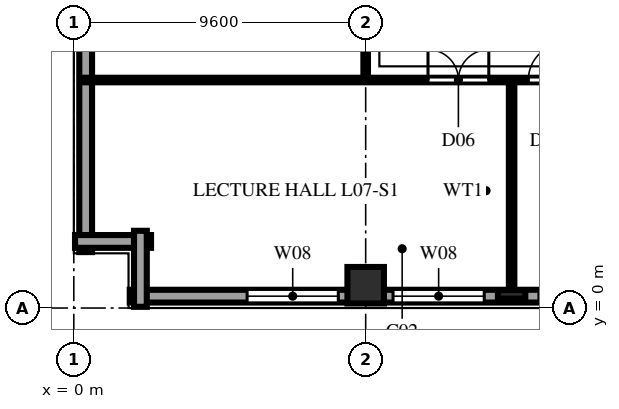
"""IFC4 building model, lengths in metres.
Left out: names, types, materials, properties, quantities, classifications, styles, units other than length and angle.
Written with IfcOpenShell. Run it as: python <this file> out.ifc"""

import sys

from ifc_helpers import new_model, si_unit, direction, frame, frame_2d, origin, origin_2d, place, context, subcontext, project, spatial, rectangle, extrude, element, fill, save


model = new_model("IFC4")
c1 = context("Model", 3, precision=1e-05, world=origin(), true_north=direction((0.0, 1.0)))
c2 = subcontext(c1, "Body", "Model", "MODEL_VIEW")
j1 = project(units=[si_unit("LENGTHUNIT", "METRE"), si_unit("PLANEANGLEUNIT", "RADIAN")], contexts=[c1])
p1 = place(None, origin())
s1 = spatial("IfcSite", under=j1, at=p1, CompositionType="ELEMENT")
p2 = place(p1, origin())
s2 = spatial("IfcBuilding", under=s1, at=p2, CompositionType="ELEMENT")
p3 = place(p2, frame((0.0, 0.0, 31.8)))
s3 = spatial("IfcBuildingStorey", under=s2, at=p3, CompositionType="ELEMENT", Elevation=31.8)
p4 = place(p3, frame((9.6, 0.75, 0.0), z_axis=(0.0, 0.0, 1.0), x_axis=(1.0, 0.0, 0.0)))
e1 = element("IfcColumn", 1, at=p4, inside=s3, PredefinedType="COLUMN", context=c2, shape_type="SweptSolid", body=[
    extrude(rectangle(XDim=1.2, YDim=1.2, at=origin_2d()), origin(), (0.0, 0.0, 1.0), 3.8),
])
p5 = place(p3, frame((14.4, 0.45, 0.0), z_axis=(0.0, 0.0, 1.0), x_axis=(1.0, 0.0, 0.0)))
e2 = element("IfcColumn", 2, at=p5, inside=s3, PredefinedType="PILASTER", context=c2, shape_type="SweptSolid", body=[
    extrude(rectangle(XDim=0.9, YDim=0.28, at=origin_2d()), origin(), (0.0, 0.0, 1.0), 3.8),
])
p6 = place(p3, frame((1.84, 0.39, 0.0), z_axis=(0.0, 0.0, 1.0), x_axis=(1.0, 0.0, 0.0)))
e3 = element("IfcWall", 3, at=p6, inside=s3, PredefinedType="SOLIDWALL", context=c2, shape_type="SweptSolid", body=[
    extrude(rectangle(XDim=63.52, YDim=0.42, at=frame_2d((31.76, 0.0))), origin(), (0.0, 0.0, 1.0), 3.54),
])
p7 = place(p6, frame((3.86, 0.0, 0.75)))
e4 = element("IfcOpeningElement", 4, at=p7, cuts=e3, PredefinedType="OPENING", context=c2, shape_type="SweptSolid", body=[
    extrude(rectangle(XDim=3.0, YDim=1.9, at=frame_2d((1.5, 0.95))), frame((0.0, 0.222, 0.0), z_axis=(0.0, -1.0, 0.0), x_axis=(1.0, 0.0, 0.0)), (0.0, 0.0, 1.0), 0.444),
])
p8 = place(p6, frame((8.66, 0.0, 0.75)))
e5 = element("IfcOpeningElement", 5, at=p8, cuts=e3, PredefinedType="OPENING", context=c2, shape_type="SweptSolid", body=[
    extrude(rectangle(XDim=3.0, YDim=1.9, at=frame_2d((1.5, 0.95))), frame((0.0, 0.222, 0.0), z_axis=(0.0, -1.0, 0.0), x_axis=(1.0, 0.0, 0.0)), (0.0, 0.0, 1.0), 0.444),
])
p9 = place(p6, frame((13.46, 0.0, 0.75)))
e6 = element("IfcOpeningElement", 6, at=p9, cuts=e3, PredefinedType="OPENING", context=c2, shape_type="SweptSolid", body=[
    extrude(rectangle(XDim=3.0, YDim=1.9, at=frame_2d((1.5, 0.95))), frame((0.0, 0.222, 0.0), z_axis=(0.0, -1.0, 0.0), x_axis=(1.0, 0.0, 0.0)), (0.0, 0.0, 1.0), 0.444),
])
p10 = place(p6, frame((18.26, 0.0, 0.75)))
e7 = element("IfcOpeningElement", 7, at=p10, cuts=e3, PredefinedType="OPENING", context=c2, shape_type="SweptSolid", body=[
    extrude(rectangle(XDim=3.0, YDim=1.9, at=frame_2d((1.5, 0.95))), frame((0.0, 0.222, 0.0), z_axis=(0.0, -1.0, 0.0), x_axis=(1.0, 0.0, 0.0)), (0.0, 0.0, 1.0), 0.444),
])
p11 = place(p6, frame((23.06, 0.0, 0.75)))
e8 = element("IfcOpeningElement", 8, at=p11, cuts=e3, PredefinedType="OPENING", context=c2, shape_type="SweptSolid", body=[
    extrude(rectangle(XDim=3.0, YDim=1.9, at=frame_2d((1.5, 0.95))), frame((0.0, 0.222, 0.0), z_axis=(0.0, -1.0, 0.0), x_axis=(1.0, 0.0, 0.0)), (0.0, 0.0, 1.0), 0.444),
])
p12 = place(p3, frame((0.39, 65.36, 0.0), z_axis=(0.0, 0.0, 1.0), x_axis=(0.0, -1.0, 0.0)))
e9 = element("IfcWall", 9, at=p12, inside=s3, PredefinedType="SOLIDWALL", context=c2, shape_type="SweptSolid", body=[
    extrude(rectangle(XDim=63.52, YDim=0.42, at=frame_2d((31.76, 0.0))), origin(), (0.0, 0.0, 1.0), 3.54),
])
p13 = place(p12, frame((4.885, 0.0, 0.9)))
e10 = element("IfcOpeningElement", 10, at=p13, cuts=e9, PredefinedType="OPENING", context=c2, shape_type="SweptSolid", body=[
    extrude(rectangle(XDim=0.95, YDim=1.85, at=frame_2d((0.475, 0.925))), frame((0.0, 0.222, 0.0), z_axis=(0.0, -1.0, 0.0), x_axis=(1.0, 0.0, 0.0)), (0.0, 0.0, 1.0), 0.444),
])
p14 = place(p12, frame((9.41, 0.0, 0.9)))
e11 = element("IfcOpeningElement", 11, at=p14, cuts=e9, PredefinedType="OPENING", context=c2, shape_type="SweptSolid", body=[
    extrude(rectangle(XDim=1.5, YDim=1.85, at=frame_2d((0.75, 0.925))), frame((0.0, 0.222, 0.0), z_axis=(0.0, -1.0, 0.0), x_axis=(1.0, 0.0, 0.0)), (0.0, 0.0, 1.0), 0.444),
])
p15 = place(p12, frame((14.485, 0.0, 0.9)))
e12 = element("IfcOpeningElement", 12, at=p15, cuts=e9, PredefinedType="OPENING", context=c2, shape_type="SweptSolid", body=[
    extrude(rectangle(XDim=0.95, YDim=1.85, at=frame_2d((0.475, 0.925))), frame((0.0, 0.222, 0.0), z_axis=(0.0, -1.0, 0.0), x_axis=(1.0, 0.0, 0.0)), (0.0, 0.0, 1.0), 0.444),
])
p16 = place(p12, frame((19.01, 0.0, 0.9)))
e13 = element("IfcOpeningElement", 13, at=p16, cuts=e9, PredefinedType="OPENING", context=c2, shape_type="SweptSolid", body=[
    extrude(rectangle(XDim=1.5, YDim=1.85, at=frame_2d((0.75, 0.925))), frame((0.0, 0.222, 0.0), z_axis=(0.0, -1.0, 0.0), x_axis=(1.0, 0.0, 0.0)), (0.0, 0.0, 1.0), 0.444),
])
p17 = place(p12, frame((24.085, 0.0, 0.9)))
e14 = element("IfcOpeningElement", 14, at=p17, cuts=e9, PredefinedType="OPENING", context=c2, shape_type="SweptSolid", body=[
    extrude(rectangle(XDim=0.95, YDim=1.85, at=frame_2d((0.475, 0.925))), frame((0.0, 0.222, 0.0), z_axis=(0.0, -1.0, 0.0), x_axis=(1.0, 0.0, 0.0)), (0.0, 0.0, 1.0), 0.444),
])
p18 = place(p12, frame((28.61, 0.0, 0.9)))
e15 = element("IfcOpeningElement", 15, at=p18, cuts=e9, PredefinedType="OPENING", context=c2, shape_type="SweptSolid", body=[
    extrude(rectangle(XDim=1.5, YDim=1.85, at=frame_2d((0.75, 0.925))), frame((0.0, 0.222, 0.0), z_axis=(0.0, -1.0, 0.0), x_axis=(1.0, 0.0, 0.0)), (0.0, 0.0, 1.0), 0.444),
])
p19 = place(p12, frame((33.685, 0.0, 0.9)))
e16 = element("IfcOpeningElement", 16, at=p19, cuts=e9, PredefinedType="OPENING", context=c2, shape_type="SweptSolid", body=[
    extrude(rectangle(XDim=0.95, YDim=1.85, at=frame_2d((0.475, 0.925))), frame((0.0, 0.222, 0.0), z_axis=(0.0, -1.0, 0.0), x_axis=(1.0, 0.0, 0.0)), (0.0, 0.0, 1.0), 0.444),
])
p20 = place(p12, frame((38.21, 0.0, 0.9)))
e17 = element("IfcOpeningElement", 17, at=p20, cuts=e9, PredefinedType="OPENING", context=c2, shape_type="SweptSolid", body=[
    extrude(rectangle(XDim=1.5, YDim=1.85, at=frame_2d((0.75, 0.925))), frame((0.0, 0.222, 0.0), z_axis=(0.0, -1.0, 0.0), x_axis=(1.0, 0.0, 0.0)), (0.0, 0.0, 1.0), 0.444),
])
p21 = place(p12, frame((43.285, 0.0, 0.9)))
e18 = element("IfcOpeningElement", 18, at=p21, cuts=e9, PredefinedType="OPENING", context=c2, shape_type="SweptSolid", body=[
    extrude(rectangle(XDim=0.95, YDim=1.85, at=frame_2d((0.475, 0.925))), frame((0.0, 0.222, 0.0), z_axis=(0.0, -1.0, 0.0), x_axis=(1.0, 0.0, 0.0)), (0.0, 0.0, 1.0), 0.444),
])
p22 = place(p12, frame((47.81, 0.0, 0.9)))
e19 = element("IfcOpeningElement", 19, at=p22, cuts=e9, PredefinedType="OPENING", context=c2, shape_type="SweptSolid", body=[
    extrude(rectangle(XDim=1.5, YDim=1.85, at=frame_2d((0.75, 0.925))), frame((0.0, 0.222, 0.0), z_axis=(0.0, -1.0, 0.0), x_axis=(1.0, 0.0, 0.0)), (0.0, 0.0, 1.0), 0.444),
])
p23 = place(p12, frame((52.885, 0.0, 0.9)))
e20 = element("IfcOpeningElement", 20, at=p23, cuts=e9, PredefinedType="OPENING", context=c2, shape_type="SweptSolid", body=[
    extrude(rectangle(XDim=0.95, YDim=1.85, at=frame_2d((0.475, 0.925))), frame((0.0, 0.222, 0.0), z_axis=(0.0, -1.0, 0.0), x_axis=(1.0, 0.0, 0.0)), (0.0, 0.0, 1.0), 0.444),
])
for number, where, z_axis, x_axis in (
    (21, (0.04, 2.19, 0.0), (0.0, 0.0, 1.0), (1.0, 0.0, 0.0)),
    (22, (2.19, 2.54, 0.0), (0.0, 0.0, 1.0), (0.0, -1.0, 0.0)),
):
    element("IfcWall", number, at=place(p3, frame(where, z_axis=z_axis, x_axis=x_axis)), inside=s3, PredefinedType="SOLIDWALL", context=c2, shape_type="SweptSolid", body=[
        extrude(rectangle(XDim=2.5, YDim=0.42, at=frame_2d((1.25, 0.0))), origin(), (0.0, 0.0, 1.0), 3.54),
    ])
p24 = place(p3, frame((9.6, 7.5, 0.0), z_axis=(0.0, 0.0, 1.0), x_axis=(0.0, 1.0, 0.0)))
e23 = element("IfcWall", 23, at=p24, inside=s3, PredefinedType="PARTITIONING", context=c2, shape_type="SweptSolid", body=[
    extrude(rectangle(XDim=2.1, YDim=0.15, at=frame_2d((1.05, 0.0))), origin(), (0.0, 0.0, 1.0), 2.923),
])
p25 = place(p3, frame((14.4, 0.22, 0.0), z_axis=(0.0, 0.0, 1.0), x_axis=(0.0, 1.0, 0.0)))
e24 = element("IfcWall", 24, at=p25, inside=s3, PredefinedType="PARTITIONING", context=c2, shape_type="SweptSolid", body=[
    extrude(rectangle(XDim=7.28, YDim=0.18, at=frame_2d((3.64, 0.0))), origin(), (0.0, 0.0, 1.0), 3.54),
])
p26 = place(p3, frame((0.22, 7.5, 0.0), z_axis=(0.0, 0.0, 1.0), x_axis=(1.0, 0.0, 0.0)))
e25 = element("IfcWall", 25, at=p26, inside=s3, PredefinedType="PARTITIONING", context=c2, shape_type="SweptSolid", body=[
    extrude(rectangle(XDim=57.38, YDim=0.15, at=frame_2d((28.69, 0.0))), origin(), (0.0, 0.0, 1.0), 3.54),
])
p27 = place(p26, frame((11.43, 0.0, 0.0)))
e26 = element("IfcOpeningElement", 26, at=p27, cuts=e25, PredefinedType="OPENING", context=c2, shape_type="SweptSolid", body=[
    extrude(rectangle(XDim=2.0, YDim=2.3, at=frame_2d((1.0, 1.15))), frame((0.0, 0.087, 0.0), z_axis=(0.0, -1.0, 0.0), x_axis=(1.0, 0.0, 0.0)), (0.0, 0.0, 1.0), 0.174),
])
p28 = place(p26, frame((14.73, 0.0, 0.0)))
e27 = element("IfcOpeningElement", 27, at=p28, cuts=e25, PredefinedType="OPENING", context=c2, shape_type="SweptSolid", body=[
    extrude(rectangle(XDim=1.2, YDim=2.2, at=frame_2d((0.6, 1.1))), frame((0.0, 0.087, 0.0), z_axis=(0.0, -1.0, 0.0), x_axis=(1.0, 0.0, 0.0)), (0.0, 0.0, 1.0), 0.174),
])
p29 = place(p26, frame((24.33, 0.0, 0.0)))
e28 = element("IfcOpeningElement", 28, at=p29, cuts=e25, PredefinedType="OPENING", context=c2, shape_type="SweptSolid", body=[
    extrude(rectangle(XDim=1.2, YDim=2.2, at=frame_2d((0.6, 1.1))), frame((0.0, 0.087, 0.0), z_axis=(0.0, -1.0, 0.0), x_axis=(1.0, 0.0, 0.0)), (0.0, 0.0, 1.0), 0.174),
])
p30 = place(p26, frame((41.68, 0.0, 0.0)))
e29 = element("IfcOpeningElement", 29, at=p30, cuts=e25, PredefinedType="OPENING", context=c2, shape_type="SweptSolid", body=[
    extrude(rectangle(XDim=1.2, YDim=2.2, at=frame_2d((0.6, 1.1))), frame((0.0, 0.087, 0.0), z_axis=(0.0, -1.0, 0.0), x_axis=(1.0, 0.0, 0.0)), (0.0, 0.0, 1.0), 0.174),
])
p31 = place(p26, frame((51.33, 0.0, 0.0)))
e30 = element("IfcOpeningElement", 30, at=p31, cuts=e25, PredefinedType="OPENING", context=c2, shape_type="SweptSolid", body=[
    extrude(rectangle(XDim=0.95, YDim=2.15, at=frame_2d((0.475, 1.075))), frame((0.0, 0.087, 0.0), z_axis=(0.0, -1.0, 0.0), x_axis=(1.0, 0.0, 0.0)), (0.0, 0.0, 1.0), 0.174),
])
p32 = place(p7, origin())
e31 = element("IfcWindow", 31, at=p32, inside=s3, PartitioningType="TRIPLE_PANEL_VERTICAL", PredefinedType="WINDOW", context=c2, shape_type="SweptSolid", body=[
    extrude(rectangle(XDim=3.0, YDim=1.9, at=frame_2d((1.5, 0.95))), frame((0.0, 0.11, 0.0), z_axis=(0.0, -1.0, 0.0), x_axis=(1.0, 0.0, 0.0)), (0.0, 0.0, 1.0), 0.06),
])
fill(e4, e31)
p33 = place(p8, origin())
e32 = element("IfcWindow", 32, at=p33, inside=s3, PartitioningType="TRIPLE_PANEL_VERTICAL", PredefinedType="WINDOW", context=c2, shape_type="SweptSolid", body=[
    extrude(rectangle(XDim=3.0, YDim=1.9, at=frame_2d((1.5, 0.95))), frame((0.0, 0.11, 0.0), z_axis=(0.0, -1.0, 0.0), x_axis=(1.0, 0.0, 0.0)), (0.0, 0.0, 1.0), 0.06),
])
fill(e5, e32)
p34 = place(p9, origin())
e33 = element("IfcWindow", 33, at=p34, inside=s3, PartitioningType="TRIPLE_PANEL_VERTICAL", PredefinedType="WINDOW", context=c2, shape_type="SweptSolid", body=[
    extrude(rectangle(XDim=3.0, YDim=1.9, at=frame_2d((1.5, 0.95))), frame((0.0, 0.11, 0.0), z_axis=(0.0, -1.0, 0.0), x_axis=(1.0, 0.0, 0.0)), (0.0, 0.0, 1.0), 0.06),
])
fill(e6, e33)
p35 = place(p27, origin())
e34 = element("IfcDoor", 34, at=p35, inside=s3, OperationType="DOUBLE_SWING_LEFT", PredefinedType="DOOR", context=c2, shape_type="SweptSolid", body=[
    extrude(rectangle(XDim=2.0, YDim=2.3, at=frame_2d((1.0, 1.15))), frame((0.0, 0.025, 0.0), z_axis=(0.0, -1.0, 0.0), x_axis=(1.0, 0.0, 0.0)), (0.0, 0.0, 1.0), 0.05),
])
fill(e26, e34)
p36 = place(p28, origin())
e35 = element("IfcDoor", 35, at=p36, inside=s3, OperationType="SINGLE_SWING_RIGHT", PredefinedType="DOOR", context=c2, shape_type="SweptSolid", body=[
    extrude(rectangle(XDim=1.2, YDim=2.2, at=frame_2d((0.6, 1.1))), frame((0.0, 0.025, 0.0), z_axis=(0.0, -1.0, 0.0), x_axis=(1.0, 0.0, 0.0)), (0.0, 0.0, 1.0), 0.05),
])
fill(e27, e35)
save(model, sys.argv[1])
